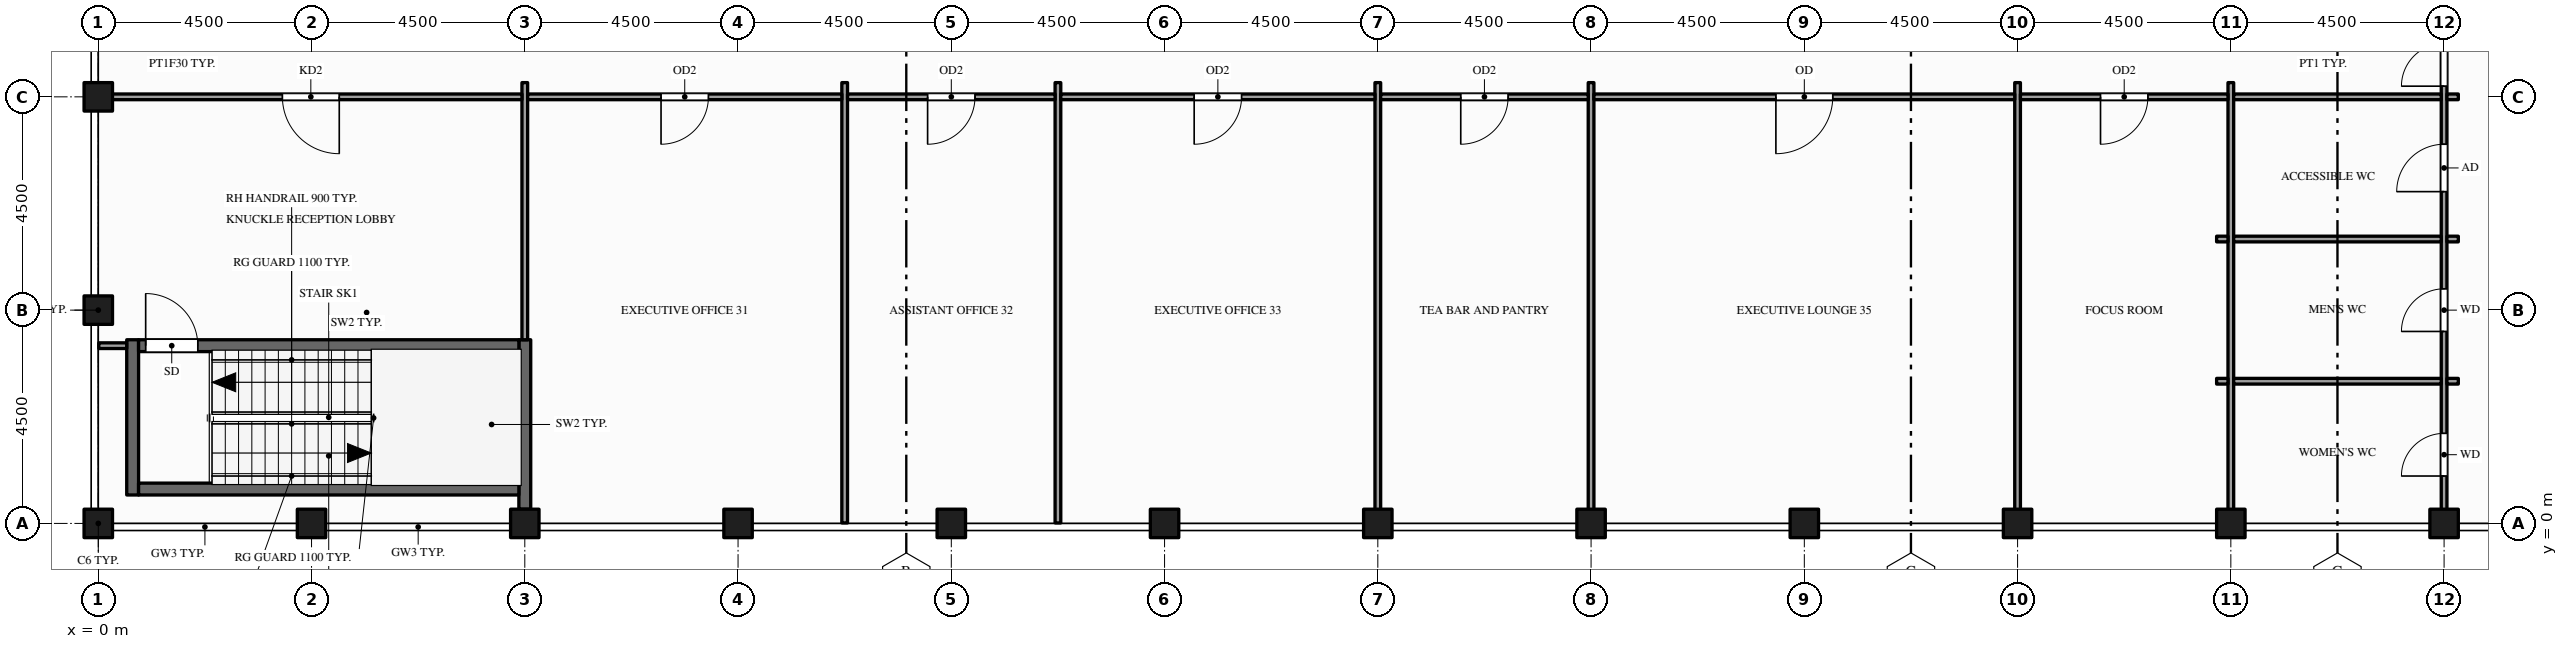
"""IFC4 building model, lengths in metres.
Left out: names, types, materials, properties, quantities, classifications, styles, units other than length and angle.
Written with IfcOpenShell. Run it as: python <this file> out.ifc"""

import sys

from ifc_helpers import new_model, si_unit, direction, frame, frame_2d, origin, origin_2d, place, context, subcontext, project, spatial, rectangle, hollow_rectangle, extrude, element, fill, save


model = new_model("IFC4")
c1 = context("Model", 3, precision=1e-05, world=origin(), true_north=direction((0.0, 1.0)))
c2 = subcontext(c1, "Body", "Model", "MODEL_VIEW")
j1 = project(units=[si_unit("LENGTHUNIT", "METRE"), si_unit("PLANEANGLEUNIT", "RADIAN")], contexts=[c1])
p1 = place(None, origin())
s1 = spatial("IfcSite", under=j1, at=p1, CompositionType="ELEMENT")
p2 = place(p1, origin())
s2 = spatial("IfcBuilding", under=s1, at=p2, CompositionType="ELEMENT")
p3 = place(p2, frame((0.0, 0.0, 327.5)))
s3 = spatial("IfcBuildingStorey", under=s2, at=p3, CompositionType="ELEMENT", Elevation=327.5)
for number, where, z_axis, x_axis in (
    (1, (0.0, 0.0, -0.15), (0.0, 0.0, 1.0), (1.0, 0.0, 0.0)),
    (2, (0.0, 4.5, -0.15), (0.0, 0.0, 1.0), (1.0, 0.0, 0.0)),
    (3, (0.0, 9.0, -0.15), (0.0, 0.0, 1.0), (1.0, 0.0, 0.0)),
    (4, (4.5, 0.0, -0.15), (0.0, 0.0, 1.0), (1.0, 0.0, 0.0)),
    (5, (9.0, 0.0, -0.15), (0.0, 0.0, 1.0), (1.0, 0.0, 0.0)),
    (6, (13.5, 0.0, -0.15), (0.0, 0.0, 1.0), (1.0, 0.0, 0.0)),
    (7, (18.0, 0.0, -0.15), (0.0, 0.0, 1.0), (1.0, 0.0, 0.0)),
    (8, (22.5, 0.0, -0.15), (0.0, 0.0, 1.0), (1.0, 0.0, 0.0)),
    (9, (27.0, 0.0, -0.15), (0.0, 0.0, 1.0), (1.0, 0.0, 0.0)),
    (10, (31.5, 0.0, -0.15), (0.0, 0.0, 1.0), (1.0, 0.0, 0.0)),
    (11, (36.0, 0.0, -0.15), (0.0, 0.0, 1.0), (1.0, 0.0, 0.0)),
    (12, (40.5, 0.0, -0.15), (0.0, 0.0, 1.0), (1.0, 0.0, 0.0)),
    (13, (45.0, 0.0, -0.15), (0.0, 0.0, 1.0), (1.0, 0.0, 0.0)),
    (14, (49.5, 0.0, -0.15), (0.0, 0.0, 1.0), (1.0, 0.0, 0.0)),
):
    element("IfcColumn", number, at=place(p3, frame(where, z_axis=z_axis, x_axis=x_axis)), inside=s3, PredefinedType="COLUMN", context=c2, shape_type="SweptSolid", body=[
        extrude(hollow_rectangle(XDim=0.6, YDim=0.6, WallThickness=0.03, at=origin_2d()), origin(), (0.0, 0.0, 1.0), 4.5),
    ])
p4 = place(p3, frame((0.725, 0.6, 0.0), z_axis=(0.0, 0.0, 1.0), x_axis=(0.0, 1.0, 0.0)))
e15 = element("IfcWall", 15, at=p4, inside=s3, PredefinedType="SHEAR", context=c2, shape_type="SweptSolid", body=[
    extrude(rectangle(XDim=3.275, YDim=0.25, at=frame_2d((1.637, 0.0))), origin(), (0.0, 0.0, 1.0), 4.35),
])
p5 = place(p3, frame((9.0, 0.3, 0.0), z_axis=(0.0, 0.0, 1.0), x_axis=(0.0, 1.0, 0.0)))
e16 = element("IfcWall", 16, at=p5, inside=s3, PredefinedType="SHEAR", context=c2, shape_type="SweptSolid", body=[
    extrude(rectangle(XDim=3.575, YDim=0.25, at=frame_2d((1.788, 0.0))), origin(), (0.0, 0.0, 1.0), 4.35),
])
p6 = place(p3, frame((9.0, 3.875, 0.0), z_axis=(0.0, 0.0, 1.0), x_axis=(0.0, 1.0, 0.0)))
e17 = element("IfcWall", 17, at=p6, inside=s3, PredefinedType="PARTITIONING", context=c2, shape_type="SweptSolid", body=[
    extrude(rectangle(XDim=5.425, YDim=0.12, at=frame_2d((2.712, 0.0))), origin(), (0.0, 0.0, 1.0), 3.359),
])
for number, where, z_axis, x_axis in (
    (18, (15.75, 0.01, 0.0), (0.0, 0.0, 1.0), (0.0, 1.0, 0.0)),
    (19, (20.25, 0.01, 0.0), (0.0, 0.0, 1.0), (0.0, 1.0, 0.0)),
    (20, (27.0, 0.01, 0.0), (0.0, 0.0, 1.0), (0.0, 1.0, 0.0)),
    (21, (31.5, 0.01, 0.0), (0.0, 0.0, 1.0), (0.0, 1.0, 0.0)),
    (22, (40.5, 0.01, 0.0), (0.0, 0.0, 1.0), (0.0, 1.0, 0.0)),
    (23, (45.0, 0.01, 0.0), (0.0, 0.0, 1.0), (0.0, 1.0, 0.0)),
):
    element("IfcWall", number, at=place(p3, frame(where, z_axis=z_axis, x_axis=x_axis)), inside=s3, PredefinedType="PARTITIONING", context=c2, shape_type="SweptSolid", body=[
        extrude(rectangle(XDim=9.29, YDim=0.12, at=frame_2d((4.645, 0.0))), origin(), (0.0, 0.0, 1.0), 3.359),
    ])
p7 = place(p3, frame((49.5, 0.01, 0.0), z_axis=(0.0, 0.0, 1.0), x_axis=(0.0, 1.0, 0.0)))
e24 = element("IfcWall", 24, at=p7, inside=s3, PredefinedType="PARTITIONING", context=c2, shape_type="SweptSolid", body=[
    extrude(rectangle(XDim=22.48, YDim=0.12, at=frame_2d((11.24, 0.0))), origin(), (0.0, 0.0, 1.0), 3.359),
])
p8 = place(p7, frame((9.215, 0.0, 0.0)))
e25 = element("IfcOpeningElement", 25, at=p8, cuts=e24, PredefinedType="OPENING", context=c2, shape_type="SweptSolid", body=[
    extrude(rectangle(XDim=1.8, YDim=2.1, at=frame_2d((0.9, 1.05))), frame((0.0, 0.07, 0.0), z_axis=(0.0, -1.0, 0.0), x_axis=(1.0, 0.0, 0.0)), (0.0, 0.0, 1.0), 0.14),
])
p9 = place(p7, frame((0.99, 0.0, 0.0)))
e26 = element("IfcOpeningElement", 26, at=p9, cuts=e24, PredefinedType="OPENING", context=c2, shape_type="SweptSolid", body=[
    extrude(rectangle(XDim=0.9, YDim=2.1, at=frame_2d((0.45, 1.05))), frame((0.0, 0.07, 0.0), z_axis=(0.0, -1.0, 0.0), x_axis=(1.0, 0.0, 0.0)), (0.0, 0.0, 1.0), 0.14),
])
p10 = place(p7, frame((4.04, 0.0, 0.0)))
e27 = element("IfcOpeningElement", 27, at=p10, cuts=e24, PredefinedType="OPENING", context=c2, shape_type="SweptSolid", body=[
    extrude(rectangle(XDim=0.9, YDim=2.1, at=frame_2d((0.45, 1.05))), frame((0.0, 0.07, 0.0), z_axis=(0.0, -1.0, 0.0), x_axis=(1.0, 0.0, 0.0)), (0.0, 0.0, 1.0), 0.14),
])
p11 = place(p7, frame((6.99, 0.0, 0.0)))
e28 = element("IfcOpeningElement", 28, at=p11, cuts=e24, PredefinedType="OPENING", context=c2, shape_type="SweptSolid", body=[
    extrude(rectangle(XDim=1.0, YDim=2.1, at=frame_2d((0.5, 1.05))), frame((0.0, 0.07, 0.0), z_axis=(0.0, -1.0, 0.0), x_axis=(1.0, 0.0, 0.0)), (0.0, 0.0, 1.0), 0.14),
])
p12 = place(p3, frame((0.85, 0.725, 0.0), z_axis=(0.0, 0.0, 1.0), x_axis=(1.0, 0.0, 0.0)))
e29 = element("IfcWall", 29, at=p12, inside=s3, PredefinedType="SHEAR", context=c2, shape_type="SweptSolid", body=[
    extrude(rectangle(XDim=8.025, YDim=0.25, at=frame_2d((4.012, 0.0))), origin(), (0.0, 0.0, 1.0), 4.35),
])
p13 = place(p3, frame((44.7, 3.0, 0.0), z_axis=(0.0, 0.0, 1.0), x_axis=(1.0, 0.0, 0.0)))
e30 = element("IfcWall", 30, at=p13, inside=s3, PredefinedType="PARTITIONING", context=c2, shape_type="SweptSolid", body=[
    extrude(rectangle(XDim=0.24, YDim=0.12, at=frame_2d((0.12, 0.0))), origin(), (0.0, 0.0, 1.0), 3.359),
])
p14 = place(p3, frame((45.06, 3.0, 0.0), z_axis=(0.0, 0.0, 1.0), x_axis=(1.0, 0.0, 0.0)))
e31 = element("IfcWall", 31, at=p14, inside=s3, PredefinedType="PARTITIONING", context=c2, shape_type="SweptSolid", body=[
    extrude(rectangle(XDim=4.38, YDim=0.12, at=frame_2d((2.19, 0.0))), origin(), (0.0, 0.0, 1.0), 3.359),
])
p15 = place(p3, frame((49.56, 3.0, 0.0), z_axis=(0.0, 0.0, 1.0), x_axis=(1.0, 0.0, 0.0)))
e32 = element("IfcWall", 32, at=p15, inside=s3, PredefinedType="PARTITIONING", context=c2, shape_type="SweptSolid", body=[
    extrude(rectangle(XDim=0.24, YDim=0.12, at=frame_2d((0.12, 0.0))), origin(), (0.0, 0.0, 1.0), 3.359),
])
p16 = place(p3, frame((0.01, 3.75, 0.0), z_axis=(0.0, 0.0, 1.0), x_axis=(1.0, 0.0, 0.0)))
e33 = element("IfcWall", 33, at=p16, inside=s3, PredefinedType="PARTITIONING", context=c2, shape_type="SweptSolid", body=[
    extrude(rectangle(XDim=0.59, YDim=0.12, at=frame_2d((0.295, 0.0))), origin(), (0.0, 0.0, 1.0), 3.672),
])
p17 = place(p3, frame((0.85, 3.75, 0.0), z_axis=(0.0, 0.0, 1.0), x_axis=(1.0, 0.0, 0.0)))
e34 = element("IfcWall", 34, at=p17, inside=s3, PredefinedType="SHEAR", context=c2, shape_type="SweptSolid", body=[
    extrude(rectangle(XDim=8.025, YDim=0.25, at=frame_2d((4.012, 0.0))), origin(), (0.0, 0.0, 1.0), 4.35),
])
p18 = place(p17, frame((0.15, 0.0, 0.0)))
e35 = element("IfcOpeningElement", 35, at=p18, cuts=e34, PredefinedType="OPENING", context=c2, shape_type="SweptSolid", body=[
    extrude(rectangle(XDim=1.1, YDim=2.1, at=frame_2d((0.55, 1.05))), frame((0.0, 0.135, 0.0), z_axis=(0.0, -1.0, 0.0), x_axis=(1.0, 0.0, 0.0)), (0.0, 0.0, 1.0), 0.27),
])
p19 = place(p3, frame((44.7, 6.0, 0.0), z_axis=(0.0, 0.0, 1.0), x_axis=(1.0, 0.0, 0.0)))
e36 = element("IfcWall", 36, at=p19, inside=s3, PredefinedType="PARTITIONING", context=c2, shape_type="SweptSolid", body=[
    extrude(rectangle(XDim=0.24, YDim=0.12, at=frame_2d((0.12, 0.0))), origin(), (0.0, 0.0, 1.0), 3.359),
])
p20 = place(p3, frame((45.06, 6.0, 0.0), z_axis=(0.0, 0.0, 1.0), x_axis=(1.0, 0.0, 0.0)))
e37 = element("IfcWall", 37, at=p20, inside=s3, PredefinedType="PARTITIONING", context=c2, shape_type="SweptSolid", body=[
    extrude(rectangle(XDim=4.38, YDim=0.12, at=frame_2d((2.19, 0.0))), origin(), (0.0, 0.0, 1.0), 3.359),
])
p21 = place(p3, frame((49.56, 6.0, 0.0), z_axis=(0.0, 0.0, 1.0), x_axis=(1.0, 0.0, 0.0)))
e38 = element("IfcWall", 38, at=p21, inside=s3, PredefinedType="PARTITIONING", context=c2, shape_type="SweptSolid", body=[
    extrude(rectangle(XDim=0.24, YDim=0.12, at=frame_2d((0.12, 0.0))), origin(), (0.0, 0.0, 1.0), 3.359),
])
p22 = place(p3, frame((0.01, 9.0, 0.0), z_axis=(0.0, 0.0, 1.0), x_axis=(1.0, 0.0, 0.0)))
e39 = element("IfcWall", 39, at=p22, inside=s3, PredefinedType="PARTITIONING", context=c2, shape_type="SweptSolid", body=[
    extrude(rectangle(XDim=8.93, YDim=0.12, at=frame_2d((4.465, 0.0))), origin(), (0.0, 0.0, 1.0), 3.359),
])
p23 = place(p22, frame((3.875, 0.0, 0.0)))
e40 = element("IfcOpeningElement", 40, at=p23, cuts=e39, PredefinedType="OPENING", context=c2, shape_type="SweptSolid", body=[
    extrude(rectangle(XDim=1.2, YDim=2.1, at=frame_2d((0.6, 1.05))), frame((0.0, 0.07, 0.0), z_axis=(0.0, -1.0, 0.0), x_axis=(1.0, 0.0, 0.0)), (0.0, 0.0, 1.0), 0.14),
])
p24 = place(p3, frame((9.06, 9.0, 0.0), z_axis=(0.0, 0.0, 1.0), x_axis=(1.0, 0.0, 0.0)))
e41 = element("IfcWall", 41, at=p24, inside=s3, PredefinedType="PARTITIONING", context=c2, shape_type="SweptSolid", body=[
    extrude(rectangle(XDim=6.63, YDim=0.12, at=frame_2d((3.315, 0.0))), origin(), (0.0, 0.0, 1.0), 3.359),
])
p25 = place(p24, frame((2.815, 0.0, 0.0)))
e42 = element("IfcOpeningElement", 42, at=p25, cuts=e41, PredefinedType="OPENING", context=c2, shape_type="SweptSolid", body=[
    extrude(rectangle(XDim=1.0, YDim=2.1, at=frame_2d((0.5, 1.05))), frame((0.0, 0.07, 0.0), z_axis=(0.0, -1.0, 0.0), x_axis=(1.0, 0.0, 0.0)), (0.0, 0.0, 1.0), 0.14),
])
p26 = place(p3, frame((15.81, 9.0, 0.0), z_axis=(0.0, 0.0, 1.0), x_axis=(1.0, 0.0, 0.0)))
e43 = element("IfcWall", 43, at=p26, inside=s3, PredefinedType="PARTITIONING", context=c2, shape_type="SweptSolid", body=[
    extrude(rectangle(XDim=4.38, YDim=0.12, at=frame_2d((2.19, 0.0))), origin(), (0.0, 0.0, 1.0), 3.359),
])
p27 = place(p26, frame((1.69, 0.0, 0.0)))
e44 = element("IfcOpeningElement", 44, at=p27, cuts=e43, PredefinedType="OPENING", context=c2, shape_type="SweptSolid", body=[
    extrude(rectangle(XDim=1.0, YDim=2.1, at=frame_2d((0.5, 1.05))), frame((0.0, 0.07, 0.0), z_axis=(0.0, -1.0, 0.0), x_axis=(1.0, 0.0, 0.0)), (0.0, 0.0, 1.0), 0.14),
])
p28 = place(p3, frame((20.31, 9.0, 0.0), z_axis=(0.0, 0.0, 1.0), x_axis=(1.0, 0.0, 0.0)))
e45 = element("IfcWall", 45, at=p28, inside=s3, PredefinedType="PARTITIONING", context=c2, shape_type="SweptSolid", body=[
    extrude(rectangle(XDim=6.63, YDim=0.12, at=frame_2d((3.315, 0.0))), origin(), (0.0, 0.0, 1.0), 3.359),
])
p29 = place(p28, frame((2.815, 0.0, 0.0)))
e46 = element("IfcOpeningElement", 46, at=p29, cuts=e45, PredefinedType="OPENING", context=c2, shape_type="SweptSolid", body=[
    extrude(rectangle(XDim=1.0, YDim=2.1, at=frame_2d((0.5, 1.05))), frame((0.0, 0.07, 0.0), z_axis=(0.0, -1.0, 0.0), x_axis=(1.0, 0.0, 0.0)), (0.0, 0.0, 1.0), 0.14),
])
p30 = place(p3, frame((27.06, 9.0, 0.0), z_axis=(0.0, 0.0, 1.0), x_axis=(1.0, 0.0, 0.0)))
e47 = element("IfcWall", 47, at=p30, inside=s3, PredefinedType="PARTITIONING", context=c2, shape_type="SweptSolid", body=[
    extrude(rectangle(XDim=4.38, YDim=0.12, at=frame_2d((2.19, 0.0))), origin(), (0.0, 0.0, 1.0), 3.359),
])
p31 = place(p30, frame((1.69, 0.0, 0.0)))
e48 = element("IfcOpeningElement", 48, at=p31, cuts=e47, PredefinedType="OPENING", context=c2, shape_type="SweptSolid", body=[
    extrude(rectangle(XDim=1.0, YDim=2.1, at=frame_2d((0.5, 1.05))), frame((0.0, 0.07, 0.0), z_axis=(0.0, -1.0, 0.0), x_axis=(1.0, 0.0, 0.0)), (0.0, 0.0, 1.0), 0.14),
])
p32 = place(p3, frame((31.56, 9.0, 0.0), z_axis=(0.0, 0.0, 1.0), x_axis=(1.0, 0.0, 0.0)))
e49 = element("IfcWall", 49, at=p32, inside=s3, PredefinedType="PARTITIONING", context=c2, shape_type="SweptSolid", body=[
    extrude(rectangle(XDim=8.88, YDim=0.12, at=frame_2d((4.44, 0.0))), origin(), (0.0, 0.0, 1.0), 3.359),
])
p33 = place(p32, frame((3.84, 0.0, 0.0)))
e50 = element("IfcOpeningElement", 50, at=p33, cuts=e49, PredefinedType="OPENING", context=c2, shape_type="SweptSolid", body=[
    extrude(rectangle(XDim=1.2, YDim=2.1, at=frame_2d((0.6, 1.05))), frame((0.0, 0.07, 0.0), z_axis=(0.0, -1.0, 0.0), x_axis=(1.0, 0.0, 0.0)), (0.0, 0.0, 1.0), 0.14),
])
p34 = place(p3, frame((40.56, 9.0, 0.0), z_axis=(0.0, 0.0, 1.0), x_axis=(1.0, 0.0, 0.0)))
e51 = element("IfcWall", 51, at=p34, inside=s3, PredefinedType="PARTITIONING", context=c2, shape_type="SweptSolid", body=[
    extrude(rectangle(XDim=4.38, YDim=0.12, at=frame_2d((2.19, 0.0))), origin(), (0.0, 0.0, 1.0), 3.359),
])
p35 = place(p34, frame((1.69, 0.0, 0.0)))
e52 = element("IfcOpeningElement", 52, at=p35, cuts=e51, PredefinedType="OPENING", context=c2, shape_type="SweptSolid", body=[
    extrude(rectangle(XDim=1.0, YDim=2.1, at=frame_2d((0.5, 1.05))), frame((0.0, 0.07, 0.0), z_axis=(0.0, -1.0, 0.0), x_axis=(1.0, 0.0, 0.0)), (0.0, 0.0, 1.0), 0.14),
])
p36 = place(p3, frame((45.06, 9.0, 0.0), z_axis=(0.0, 0.0, 1.0), x_axis=(1.0, 0.0, 0.0)))
e53 = element("IfcWall", 53, at=p36, inside=s3, PredefinedType="PARTITIONING", context=c2, shape_type="SweptSolid", body=[
    extrude(rectangle(XDim=4.38, YDim=0.12, at=frame_2d((2.19, 0.0))), origin(), (0.0, 0.0, 1.0), 3.359),
])
p37 = place(p3, frame((49.56, 9.0, 0.0), z_axis=(0.0, 0.0, 1.0), x_axis=(1.0, 0.0, 0.0)))
e54 = element("IfcWall", 54, at=p37, inside=s3, PredefinedType="PARTITIONING", context=c2, shape_type="SweptSolid", body=[
    extrude(rectangle(XDim=0.24, YDim=0.12, at=frame_2d((0.12, 0.0))), origin(), (0.0, 0.0, 1.0), 3.359),
])
p38 = place(p8, origin())
e55 = element("IfcDoor", 55, at=p38, inside=s3, OperationType="DOUBLE_DOOR_SINGLE_SWING", PredefinedType="DOOR", context=c2, shape_type="SweptSolid", body=[
    extrude(rectangle(XDim=1.8, YDim=2.1, at=frame_2d((0.9, 1.05))), frame((0.0, 0.025, 0.0), z_axis=(0.0, -1.0, 0.0), x_axis=(1.0, 0.0, 0.0)), (0.0, 0.0, 1.0), 0.05),
])
fill(e25, e55)
p39 = place(p18, origin())
e56 = element("IfcDoor", 56, at=p39, inside=s3, OperationType="SINGLE_SWING_LEFT", PredefinedType="DOOR", context=c2, shape_type="SweptSolid", body=[
    extrude(rectangle(XDim=1.1, YDim=2.1, at=frame_2d((0.55, 1.05))), frame((0.0, 0.025, 0.0), z_axis=(0.0, -1.0, 0.0), x_axis=(1.0, 0.0, 0.0)), (0.0, 0.0, 1.0), 0.05),
])
fill(e35, e56)
p40 = place(p23, origin())
e57 = element("IfcDoor", 57, at=p40, inside=s3, OperationType="SINGLE_SWING_RIGHT", PredefinedType="DOOR", context=c2, shape_type="SweptSolid", body=[
    extrude(rectangle(XDim=1.2, YDim=2.1, at=frame_2d((0.6, 1.05))), frame((0.0, 0.025, 0.0), z_axis=(0.0, -1.0, 0.0), x_axis=(1.0, 0.0, 0.0)), (0.0, 0.0, 1.0), 0.05),
])
fill(e40, e57)
p41 = place(p25, origin())
e58 = element("IfcDoor", 58, at=p41, inside=s3, OperationType="SINGLE_SWING_LEFT", PredefinedType="DOOR", context=c2, shape_type="SweptSolid", body=[
    extrude(rectangle(XDim=1.0, YDim=2.1, at=frame_2d((0.5, 1.05))), frame((0.0, 0.025, 0.0), z_axis=(0.0, -1.0, 0.0), x_axis=(1.0, 0.0, 0.0)), (0.0, 0.0, 1.0), 0.05),
])
fill(e42, e58)
p42 = place(p27, origin())
e59 = element("IfcDoor", 59, at=p42, inside=s3, OperationType="SINGLE_SWING_LEFT", PredefinedType="DOOR", context=c2, shape_type="SweptSolid", body=[
    extrude(rectangle(XDim=1.0, YDim=2.1, at=frame_2d((0.5, 1.05))), frame((0.0, 0.025, 0.0), z_axis=(0.0, -1.0, 0.0), x_axis=(1.0, 0.0, 0.0)), (0.0, 0.0, 1.0), 0.05),
])
fill(e44, e59)
p43 = place(p29, origin())
e60 = element("IfcDoor", 60, at=p43, inside=s3, OperationType="SINGLE_SWING_LEFT", PredefinedType="DOOR", context=c2, shape_type="SweptSolid", body=[
    extrude(rectangle(XDim=1.0, YDim=2.1, at=frame_2d((0.5, 1.05))), frame((0.0, 0.025, 0.0), z_axis=(0.0, -1.0, 0.0), x_axis=(1.0, 0.0, 0.0)), (0.0, 0.0, 1.0), 0.05),
])
fill(e46, e60)
p44 = place(p31, origin())
e61 = element("IfcDoor", 61, at=p44, inside=s3, OperationType="SINGLE_SWING_LEFT", PredefinedType="DOOR", context=c2, shape_type="SweptSolid", body=[
    extrude(rectangle(XDim=1.0, YDim=2.1, at=frame_2d((0.5, 1.05))), frame((0.0, 0.025, 0.0), z_axis=(0.0, -1.0, 0.0), x_axis=(1.0, 0.0, 0.0)), (0.0, 0.0, 1.0), 0.05),
])
fill(e48, e61)
p45 = place(p33, origin())
e62 = element("IfcDoor", 62, at=p45, inside=s3, OperationType="SINGLE_SWING_LEFT", PredefinedType="DOOR", context=c2, shape_type="SweptSolid", body=[
    extrude(rectangle(XDim=1.2, YDim=2.1, at=frame_2d((0.6, 1.05))), frame((0.0, 0.025, 0.0), z_axis=(0.0, -1.0, 0.0), x_axis=(1.0, 0.0, 0.0)), (0.0, 0.0, 1.0), 0.05),
])
fill(e50, e62)
p46 = place(p35, origin())
e63 = element("IfcDoor", 63, at=p46, inside=s3, OperationType="SINGLE_SWING_LEFT", PredefinedType="DOOR", context=c2, shape_type="SweptSolid", body=[
    extrude(rectangle(XDim=1.0, YDim=2.1, at=frame_2d((0.5, 1.05))), frame((0.0, 0.025, 0.0), z_axis=(0.0, -1.0, 0.0), x_axis=(1.0, 0.0, 0.0)), (0.0, 0.0, 1.0), 0.05),
])
fill(e52, e63)
p47 = place(p9, origin())
e64 = element("IfcDoor", 64, at=p47, inside=s3, OperationType="SINGLE_SWING_LEFT", PredefinedType="DOOR", context=c2, shape_type="SweptSolid", body=[
    extrude(rectangle(XDim=0.9, YDim=2.1, at=frame_2d((0.45, 1.05))), frame((0.0, 0.025, 0.0), z_axis=(0.0, -1.0, 0.0), x_axis=(1.0, 0.0, 0.0)), (0.0, 0.0, 1.0), 0.05),
])
fill(e26, e64)
p48 = place(p10, origin())
e65 = element("IfcDoor", 65, at=p48, inside=s3, OperationType="SINGLE_SWING_LEFT", PredefinedType="DOOR", context=c2, shape_type="SweptSolid", body=[
    extrude(rectangle(XDim=0.9, YDim=2.1, at=frame_2d((0.45, 1.05))), frame((0.0, 0.025, 0.0), z_axis=(0.0, -1.0, 0.0), x_axis=(1.0, 0.0, 0.0)), (0.0, 0.0, 1.0), 0.05),
])
fill(e27, e65)
p49 = place(p11, origin())
e66 = element("IfcDoor", 66, at=p49, inside=s3, OperationType="SINGLE_SWING_LEFT", PredefinedType="DOOR", context=c2, shape_type="SweptSolid", body=[
    extrude(rectangle(XDim=1.0, YDim=2.1, at=frame_2d((0.5, 1.05))), frame((0.0, 0.025, 0.0), z_axis=(0.0, -1.0, 0.0), x_axis=(1.0, 0.0, 0.0)), (0.0, 0.0, 1.0), 0.05),
])
fill(e28, e66)
save(model, sys.argv[1])
